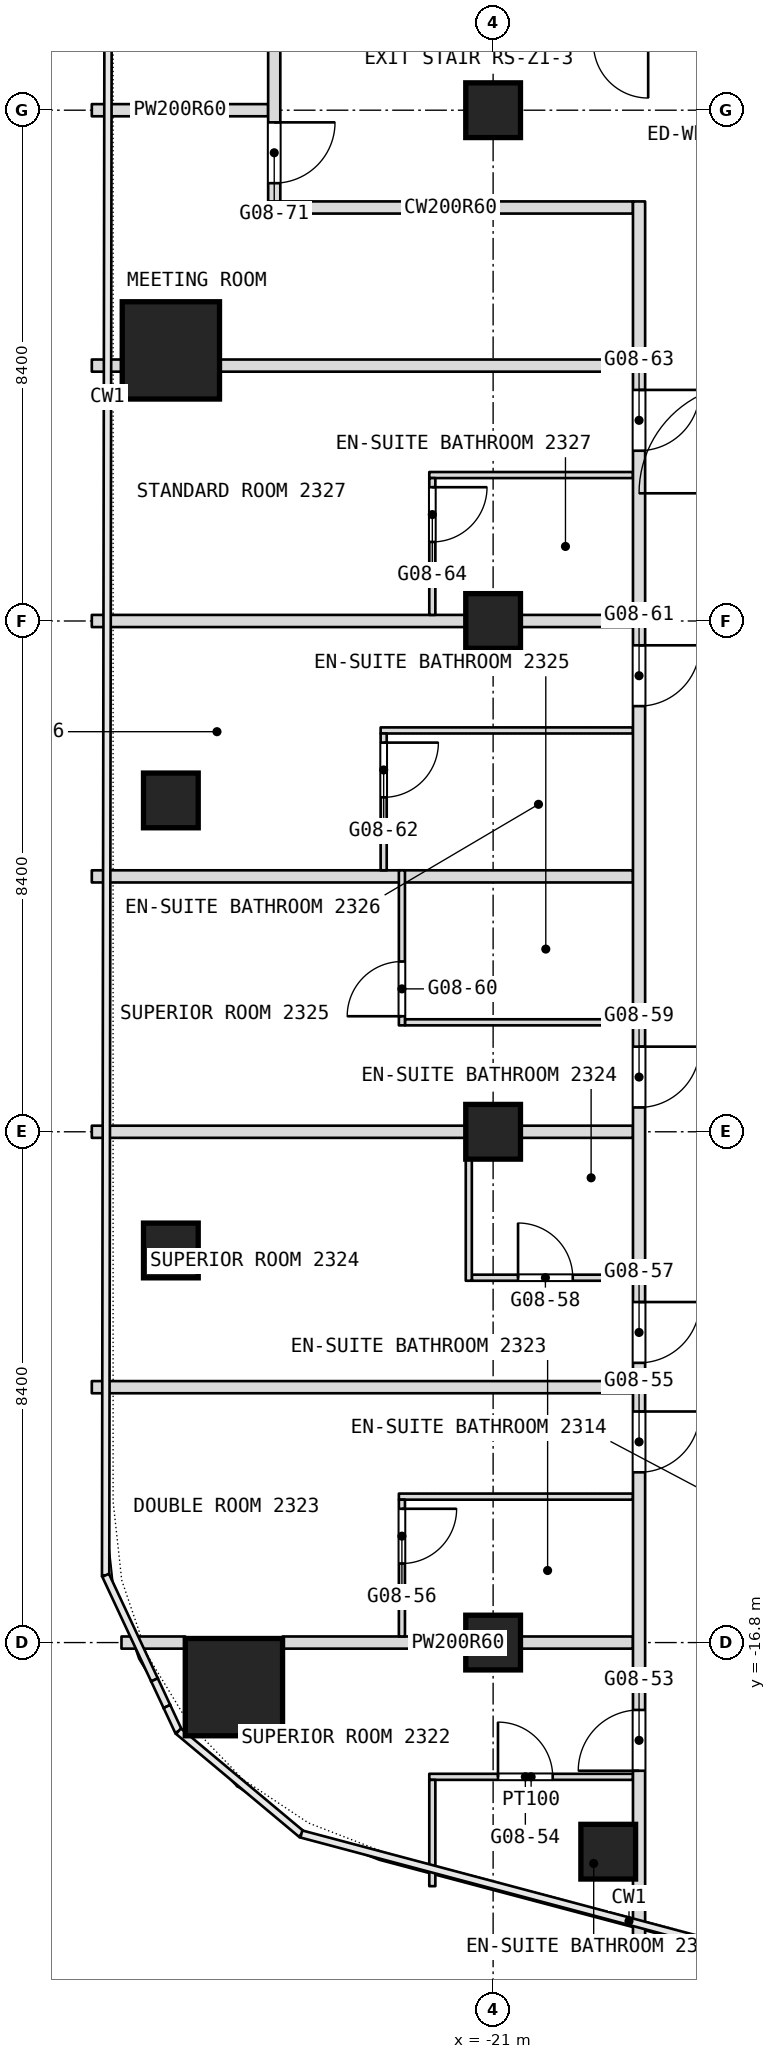
"""IFC4 building model, lengths in metres.
Left out: names, types, materials, properties, quantities, classifications, styles, units other than length and angle.
Written with IfcOpenShell. Run it as: python <this file> out.ifc"""

import sys

from ifc_helpers import new_model, si_unit, direction, frame, frame_2d, origin, origin_2d, place, context, subcontext, project, spatial, rectangle, extrude, element, fill, save


model = new_model("IFC4")
c1 = context("Model", 3, precision=1e-05, world=origin(), true_north=direction((0.0, 1.0)))
c2 = subcontext(c1, "Body", "Model", "MODEL_VIEW")
j1 = project(units=[si_unit("LENGTHUNIT", "METRE"), si_unit("PLANEANGLEUNIT", "RADIAN")], contexts=[c1])
p1 = place(None, origin())
s1 = spatial("IfcSite", under=j1, at=p1, CompositionType="ELEMENT")
p2 = place(p1, origin())
s2 = spatial("IfcBuilding", under=s1, at=p2, CompositionType="ELEMENT")
p3 = place(p2, frame((0.0, 0.0, 108.5)))
s3 = spatial("IfcBuildingStorey", under=s2, at=p3, CompositionType="ELEMENT", Elevation=108.5)
for number, where, z_axis, x_axis in (
    (1, (-25.263, -17.533, 0.0), (0.0, 0.0, 1.0), (1.0, 0.0, 0.0)),
    (2, (-26.3, 4.45, 0.0), (0.0, 0.0, 1.0), (1.0, 0.0, 0.0)),
):
    element("IfcColumn", number, at=place(p3, frame(where, z_axis=z_axis, x_axis=x_axis)), inside=s3, PredefinedType="COLUMN", context=c2, shape_type="SweptSolid", body=[
        extrude(rectangle(XDim=1.6, YDim=1.6, at=origin_2d()), origin(), (0.0, 0.0, 1.0), 3.6),
    ])
for number, where, z_axis, x_axis in (
    (3, (-21.0, -16.8, 0.0), (0.0, 0.0, 1.0), (1.0, 0.0, 0.0)),
    (4, (-21.0, -8.4, 0.0), (0.0, 0.0, 1.0), (1.0, 0.0, 0.0)),
    (5, (-21.0, 0.0, 0.0), (0.0, 0.0, 1.0), (1.0, 0.0, 0.0)),
    (6, (-21.0, 8.4, 0.0), (0.0, 0.0, 1.0), (1.0, 0.0, 0.0)),
    (7, (-26.3, -10.352, 0.0), (0.0, 0.0, 1.0), (1.0, 0.0, 0.0)),
    (8, (-26.3, -2.951, 0.0), (0.0, 0.0, 1.0), (1.0, 0.0, 0.0)),
    (9, (-19.107, -20.239, 0.0), (0.0, 0.0, 1.0), (1.0, 0.0, 0.0)),
):
    element("IfcColumn", number, at=place(p3, frame(where, z_axis=z_axis, x_axis=x_axis)), inside=s3, PredefinedType="COLUMN", context=c2, shape_type="SweptSolid", body=[
        extrude(rectangle(XDim=0.9, YDim=0.9, at=origin_2d()), origin(), (0.0, 0.0, 1.0), 3.6),
    ])
p4 = place(p3, frame((-22.05, -19.008, 0.0), z_axis=(0.0, 0.0, 1.0), x_axis=(1.0, 0.0, 0.0)))
e10 = element("IfcWall", 10, at=p4, inside=s3, PredefinedType="PARTITIONING", context=c2, shape_type="SweptSolid", body=[
    extrude(rectangle(XDim=3.35, YDim=0.1, at=frame_2d((1.675, 0.0))), origin(), (0.0, 0.0, 1.0), 3.34),
])
p5 = place(p4, frame((1.13, 0.0, 0.0)))
e11 = element("IfcOpeningElement", 11, at=p5, cuts=e10, PredefinedType="OPENING", context=c2, shape_type="SweptSolid", body=[
    extrude(rectangle(XDim=0.9, YDim=2.1, at=frame_2d((0.45, 1.05))), frame((0.0, 0.05, 0.0), z_axis=(0.0, -1.0, 0.0), x_axis=(1.0, 0.0, 0.0)), (0.0, 0.0, 1.0), 0.1),
])
p6 = place(p3, frame((-27.112, -16.8, 0.0), z_axis=(0.0, 0.0, 1.0), x_axis=(1.0, 0.0, 0.0)))
e12 = element("IfcWall", 12, at=p6, inside=s3, PredefinedType="PARTITIONING", context=c2, shape_type="SweptSolid", body=[
    extrude(rectangle(XDim=1.049, YDim=0.2, at=frame_2d((0.524, 0.0))), origin(), (0.0, 0.0, 1.0), 3.34),
])
p7 = place(p3, frame((-24.463, -16.8, 0.0), z_axis=(0.0, 0.0, 1.0), x_axis=(1.0, 0.0, 0.0)))
e13 = element("IfcWall", 13, at=p7, inside=s3, PredefinedType="PARTITIONING", context=c2, shape_type="SweptSolid", body=[
    extrude(rectangle(XDim=5.763, YDim=0.2, at=frame_2d((2.881, 0.0))), origin(), (0.0, 0.0, 1.0), 2.89),
])
p8 = place(p3, frame((-22.55, -14.4, 0.0), z_axis=(0.0, 0.0, 1.0), x_axis=(1.0, 0.0, 0.0)))
e14 = element("IfcWall", 14, at=p8, inside=s3, PredefinedType="PARTITIONING", context=c2, shape_type="SweptSolid", body=[
    extrude(rectangle(XDim=3.85, YDim=0.1, at=frame_2d((1.925, 0.0))), origin(), (0.0, 0.0, 1.0), 3.34),
])
p9 = place(p3, frame((-27.6, -12.6, 0.0), z_axis=(0.0, 0.0, 1.0), x_axis=(1.0, 0.0, 0.0)))
e15 = element("IfcWall", 15, at=p9, inside=s3, PredefinedType="PARTITIONING", context=c2, shape_type="SweptSolid", body=[
    extrude(rectangle(XDim=8.9, YDim=0.2, at=frame_2d((4.45, 0.0))), origin(), (0.0, 0.0, 1.0), 3.34),
])
p10 = place(p3, frame((-21.35, -10.8, 0.0), z_axis=(0.0, 0.0, 1.0), x_axis=(1.0, 0.0, 0.0)))
e16 = element("IfcWall", 16, at=p10, inside=s3, PredefinedType="PARTITIONING", context=c2, shape_type="SweptSolid", body=[
    extrude(rectangle(XDim=2.65, YDim=0.1, at=frame_2d((1.325, 0.0))), origin(), (0.0, 0.0, 1.0), 3.34),
])
p11 = place(p10, frame((0.76, 0.0, 0.0)))
e17 = element("IfcOpeningElement", 17, at=p11, cuts=e16, PredefinedType="OPENING", context=c2, shape_type="SweptSolid", body=[
    extrude(rectangle(XDim=0.9, YDim=2.1, at=frame_2d((0.45, 1.05))), frame((0.0, 0.05, 0.0), z_axis=(0.0, -1.0, 0.0), x_axis=(1.0, 0.0, 0.0)), (0.0, 0.0, 1.0), 0.1),
])
p12 = place(p3, frame((-27.6, -8.4, 0.0), z_axis=(0.0, 0.0, 1.0), x_axis=(1.0, 0.0, 0.0)))
e18 = element("IfcWall", 18, at=p12, inside=s3, PredefinedType="PARTITIONING", context=c2, shape_type="SweptSolid", body=[
    extrude(rectangle(XDim=8.9, YDim=0.2, at=frame_2d((4.45, 0.0))), origin(), (0.0, 0.0, 1.0), 2.89),
])
p13 = place(p3, frame((-22.45, -6.6, 0.0), z_axis=(0.0, 0.0, 1.0), x_axis=(1.0, 0.0, 0.0)))
e19 = element("IfcWall", 19, at=p13, inside=s3, PredefinedType="PARTITIONING", context=c2, shape_type="SweptSolid", body=[
    extrude(rectangle(XDim=3.75, YDim=0.1, at=frame_2d((1.875, 0.0))), origin(), (0.0, 0.0, 1.0), 3.34),
])
p14 = place(p3, frame((-27.6, -4.2, 0.0), z_axis=(0.0, 0.0, 1.0), x_axis=(1.0, 0.0, 0.0)))
e20 = element("IfcWall", 20, at=p14, inside=s3, PredefinedType="PARTITIONING", context=c2, shape_type="SweptSolid", body=[
    extrude(rectangle(XDim=8.9, YDim=0.2, at=frame_2d((4.45, 0.0))), origin(), (0.0, 0.0, 1.0), 3.34),
])
p15 = place(p3, frame((-22.85, -1.8, 0.0), z_axis=(0.0, 0.0, 1.0), x_axis=(1.0, 0.0, 0.0)))
e21 = element("IfcWall", 21, at=p15, inside=s3, PredefinedType="PARTITIONING", context=c2, shape_type="SweptSolid", body=[
    extrude(rectangle(XDim=4.15, YDim=0.1, at=frame_2d((2.075, 0.0))), origin(), (0.0, 0.0, 1.0), 3.34),
])
p16 = place(p3, frame((-27.6, 0.0, 0.0), z_axis=(0.0, 0.0, 1.0), x_axis=(1.0, 0.0, 0.0)))
e22 = element("IfcWall", 22, at=p16, inside=s3, PredefinedType="PARTITIONING", context=c2, shape_type="SweptSolid", body=[
    extrude(rectangle(XDim=8.9, YDim=0.2, at=frame_2d((4.45, 0.0))), origin(), (0.0, 0.0, 1.0), 2.89),
])
p17 = place(p3, frame((-22.05, 2.4, 0.0), z_axis=(0.0, 0.0, 1.0), x_axis=(1.0, 0.0, 0.0)))
e23 = element("IfcWall", 23, at=p17, inside=s3, PredefinedType="PARTITIONING", context=c2, shape_type="SweptSolid", body=[
    extrude(rectangle(XDim=3.35, YDim=0.1, at=frame_2d((1.675, 0.0))), origin(), (0.0, 0.0, 1.0), 3.34),
])
p18 = place(p3, frame((-27.6, 4.2, 0.0), z_axis=(0.0, 0.0, 1.0), x_axis=(1.0, 0.0, 0.0)))
e24 = element("IfcWall", 24, at=p18, inside=s3, PredefinedType="PARTITIONING", context=c2, shape_type="SweptSolid", body=[
    extrude(rectangle(XDim=0.5, YDim=0.2, at=frame_2d((0.25, 0.0))), origin(), (0.0, 0.0, 1.0), 3.34),
])
p19 = place(p3, frame((-25.5, 4.2, 0.0), z_axis=(0.0, 0.0, 1.0), x_axis=(1.0, 0.0, 0.0)))
e25 = element("IfcWall", 25, at=p19, inside=s3, PredefinedType="PARTITIONING", context=c2, shape_type="SweptSolid", body=[
    extrude(rectangle(XDim=6.8, YDim=0.2, at=frame_2d((3.4, 0.0))), origin(), (0.0, 0.0, 1.0), 3.34),
])
p20 = place(p3, frame((-24.7, 6.8, 0.0), z_axis=(0.0, 0.0, 1.0), x_axis=(1.0, 0.0, 0.0)))
e26 = element("IfcWall", 26, at=p20, inside=s3, PredefinedType="PARTITIONING", context=c2, shape_type="SweptSolid", body=[
    extrude(rectangle(XDim=6.0, YDim=0.2, at=frame_2d((3.0, 0.0))), origin(), (0.0, 0.0, 1.0), 3.34),
])
p21 = place(p3, frame((-27.6, 8.4, 0.0), z_axis=(0.0, 0.0, 1.0), x_axis=(1.0, 0.0, 0.0)))
e27 = element("IfcWall", 27, at=p21, inside=s3, PredefinedType="PARTITIONING", context=c2, shape_type="SweptSolid", body=[
    extrude(rectangle(XDim=2.9, YDim=0.2, at=frame_2d((1.45, 0.0))), origin(), (0.0, 0.0, 1.0), 2.89),
])
p22 = place(p3, frame((-18.6, -21.708, 0.0), z_axis=(0.0, 0.0, 1.0), x_axis=(0.0, 1.0, 0.0)))
e28 = element("IfcWall", 28, at=p22, inside=s3, PredefinedType="PARTITIONING", context=c2, shape_type="SweptSolid", body=[
    extrude(rectangle(XDim=28.608, YDim=0.2, at=frame_2d((14.304, 0.0))), origin(), (0.0, 0.0, 1.0), 3.34),
])
p23 = place(p22, frame((2.8, 0.0, 0.0)))
e29 = element("IfcOpeningElement", 29, at=p23, cuts=e28, PredefinedType="OPENING", context=c2, shape_type="SweptSolid", body=[
    extrude(rectangle(XDim=1.0, YDim=2.1, at=frame_2d((0.5, 1.05))), frame((0.0, 0.1, 0.0), z_axis=(0.0, -1.0, 0.0), x_axis=(1.0, 0.0, 0.0)), (0.0, 0.0, 1.0), 0.2),
])
p24 = place(p22, frame((7.708, 0.0, 0.0)))
e30 = element("IfcOpeningElement", 30, at=p24, cuts=e28, PredefinedType="OPENING", context=c2, shape_type="SweptSolid", body=[
    extrude(rectangle(XDim=1.0, YDim=2.1, at=frame_2d((0.5, 1.05))), frame((0.0, 0.1, 0.0), z_axis=(0.0, -1.0, 0.0), x_axis=(1.0, 0.0, 0.0)), (0.0, 0.0, 1.0), 0.2),
])
p25 = place(p22, frame((9.508, 0.0, 0.0)))
e31 = element("IfcOpeningElement", 31, at=p25, cuts=e28, PredefinedType="OPENING", context=c2, shape_type="SweptSolid", body=[
    extrude(rectangle(XDim=1.0, YDim=2.1, at=frame_2d((0.5, 1.05))), frame((0.0, 0.1, 0.0), z_axis=(0.0, -1.0, 0.0), x_axis=(1.0, 0.0, 0.0)), (0.0, 0.0, 1.0), 0.2),
])
p26 = place(p22, frame((13.708, 0.0, 0.0)))
e32 = element("IfcOpeningElement", 32, at=p26, cuts=e28, PredefinedType="OPENING", context=c2, shape_type="SweptSolid", body=[
    extrude(rectangle(XDim=1.0, YDim=2.1, at=frame_2d((0.5, 1.05))), frame((0.0, 0.1, 0.0), z_axis=(0.0, -1.0, 0.0), x_axis=(1.0, 0.0, 0.0)), (0.0, 0.0, 1.0), 0.2),
])
p27 = place(p22, frame((20.308, 0.0, 0.0)))
e33 = element("IfcOpeningElement", 33, at=p27, cuts=e28, PredefinedType="OPENING", context=c2, shape_type="SweptSolid", body=[
    extrude(rectangle(XDim=1.0, YDim=2.1, at=frame_2d((0.5, 1.05))), frame((0.0, 0.1, 0.0), z_axis=(0.0, -1.0, 0.0), x_axis=(1.0, 0.0, 0.0)), (0.0, 0.0, 1.0), 0.2),
])
p28 = place(p22, frame((24.508, 0.0, 0.0)))
e34 = element("IfcOpeningElement", 34, at=p28, cuts=e28, PredefinedType="OPENING", context=c2, shape_type="SweptSolid", body=[
    extrude(rectangle(XDim=1.0, YDim=2.1, at=frame_2d((0.5, 1.05))), frame((0.0, 0.1, 0.0), z_axis=(0.0, -1.0, 0.0), x_axis=(1.0, 0.0, 0.0)), (0.0, 0.0, 1.0), 0.2),
])
p29 = place(p3, frame((-21.4, -10.85, 0.0), z_axis=(0.0, 0.0, 1.0), x_axis=(0.0, 1.0, 0.0)))
e35 = element("IfcWall", 35, at=p29, inside=s3, PredefinedType="PARTITIONING", context=c2, shape_type="SweptSolid", body=[
    extrude(rectangle(XDim=2.55, YDim=0.1, at=frame_2d((1.275, 0.0))), origin(), (0.0, 0.0, 1.0), 3.34),
])
p30 = place(p3, frame((-22.0, -20.806, 0.0), z_axis=(0.0, 0.0, 1.0), x_axis=(0.0, 1.0, 0.0)))
e36 = element("IfcWall", 36, at=p30, inside=s3, PredefinedType="PARTITIONING", context=c2, shape_type="SweptSolid", body=[
    extrude(rectangle(XDim=1.748, YDim=0.1, at=frame_2d((0.874, 0.0))), origin(), (0.0, 0.0, 1.0), 3.34),
])
p31 = place(p3, frame((-22.0, 0.1, 0.0), z_axis=(0.0, 0.0, 1.0), x_axis=(0.0, 1.0, 0.0)))
e37 = element("IfcWall", 37, at=p31, inside=s3, PredefinedType="PARTITIONING", context=c2, shape_type="SweptSolid", body=[
    extrude(rectangle(XDim=2.25, YDim=0.1, at=frame_2d((1.125, 0.0))), origin(), (0.0, 0.0, 1.0), 3.34),
])
p32 = place(p31, frame((1.2, 0.0, 0.0)))
e38 = element("IfcOpeningElement", 38, at=p32, cuts=e37, PredefinedType="OPENING", context=c2, shape_type="SweptSolid", body=[
    extrude(rectangle(XDim=0.9, YDim=2.1, at=frame_2d((0.45, 1.05))), frame((0.0, 0.05, 0.0), z_axis=(0.0, -1.0, 0.0), x_axis=(1.0, 0.0, 0.0)), (0.0, 0.0, 1.0), 0.1),
])
p33 = place(p3, frame((-22.5, -16.7, 0.0), z_axis=(0.0, 0.0, 1.0), x_axis=(0.0, 1.0, 0.0)))
e39 = element("IfcWall", 39, at=p33, inside=s3, PredefinedType="PARTITIONING", context=c2, shape_type="SweptSolid", body=[
    extrude(rectangle(XDim=2.25, YDim=0.1, at=frame_2d((1.125, 0.0))), origin(), (0.0, 0.0, 1.0), 3.34),
])
p34 = place(p33, frame((1.2, 0.0, 0.0)))
e40 = element("IfcOpeningElement", 40, at=p34, cuts=e39, PredefinedType="OPENING", context=c2, shape_type="SweptSolid", body=[
    extrude(rectangle(XDim=0.9, YDim=2.1, at=frame_2d((0.45, 1.05))), frame((0.0, 0.05, 0.0), z_axis=(0.0, -1.0, 0.0), x_axis=(1.0, 0.0, 0.0)), (0.0, 0.0, 1.0), 0.1),
])
p35 = place(p3, frame((-22.5, -6.65, 0.0), z_axis=(0.0, 0.0, 1.0), x_axis=(0.0, 1.0, 0.0)))
e41 = element("IfcWall", 41, at=p35, inside=s3, PredefinedType="PARTITIONING", context=c2, shape_type="SweptSolid", body=[
    extrude(rectangle(XDim=2.55, YDim=0.1, at=frame_2d((1.275, 0.0))), origin(), (0.0, 0.0, 1.0), 3.34),
])
p36 = place(p35, frame((0.15, 0.0, 0.0)))
e42 = element("IfcOpeningElement", 42, at=p36, cuts=e41, PredefinedType="OPENING", context=c2, shape_type="SweptSolid", body=[
    extrude(rectangle(XDim=0.9, YDim=2.1, at=frame_2d((0.45, 1.05))), frame((0.0, 0.05, 0.0), z_axis=(0.0, -1.0, 0.0), x_axis=(1.0, 0.0, 0.0)), (0.0, 0.0, 1.0), 0.1),
])
p37 = place(p3, frame((-22.8, -4.1, 0.0), z_axis=(0.0, 0.0, 1.0), x_axis=(0.0, 1.0, 0.0)))
e43 = element("IfcWall", 43, at=p37, inside=s3, PredefinedType="PARTITIONING", context=c2, shape_type="SweptSolid", body=[
    extrude(rectangle(XDim=2.25, YDim=0.1, at=frame_2d((1.125, 0.0))), origin(), (0.0, 0.0, 1.0), 3.34),
])
p38 = place(p37, frame((1.2, 0.0, 0.0)))
e44 = element("IfcOpeningElement", 44, at=p38, cuts=e43, PredefinedType="OPENING", context=c2, shape_type="SweptSolid", body=[
    extrude(rectangle(XDim=0.9, YDim=2.1, at=frame_2d((0.45, 1.05))), frame((0.0, 0.05, 0.0), z_axis=(0.0, -1.0, 0.0), x_axis=(1.0, 0.0, 0.0)), (0.0, 0.0, 1.0), 0.1),
])
p39 = place(p3, frame((-24.6, 6.9, 0.0), z_axis=(0.0, 0.0, 1.0), x_axis=(0.0, 1.0, 0.0)))
e45 = element("IfcWall", 45, at=p39, inside=s3, PredefinedType="PARTITIONING", context=c2, shape_type="SweptSolid", body=[
    extrude(rectangle(XDim=11.6, YDim=0.2, at=frame_2d((5.8, 0.0))), origin(), (0.0, 0.0, 1.0), 3.34),
])
p40 = place(p39, frame((5.45, 0.0, 0.0)))
e46 = element("IfcOpeningElement", 46, at=p40, cuts=e45, PredefinedType="OPENING", context=c2, shape_type="SweptSolid", body=[
    extrude(rectangle(XDim=1.8, YDim=2.1, at=frame_2d((0.9, 1.05))), frame((0.0, 0.1, 0.0), z_axis=(0.0, -1.0, 0.0), x_axis=(1.0, 0.0, 0.0)), (0.0, 0.0, 1.0), 0.2),
])
p41 = place(p39, frame((0.3, 0.0, 0.0)))
e47 = element("IfcOpeningElement", 47, at=p41, cuts=e45, PredefinedType="OPENING", context=c2, shape_type="SweptSolid", body=[
    extrude(rectangle(XDim=1.0, YDim=2.1, at=frame_2d((0.5, 1.05))), frame((0.0, 0.1, 0.0), z_axis=(0.0, -1.0, 0.0), x_axis=(1.0, 0.0, 0.0)), (0.0, 0.0, 1.0), 0.2),
])
p42 = place(p5, origin())
e48 = element("IfcDoor", 48, at=p42, inside=s3, OperationType="SINGLE_SWING_LEFT", PredefinedType="DOOR", context=c2, shape_type="SweptSolid", body=[
    extrude(rectangle(XDim=0.9, YDim=2.1, at=frame_2d((0.45, 1.05))), frame((0.0, 0.025, 0.0), z_axis=(0.0, -1.0, 0.0), x_axis=(1.0, 0.0, 0.0)), (0.0, 0.0, 1.0), 0.05),
])
fill(e11, e48)
p43 = place(p11, origin())
e49 = element("IfcDoor", 49, at=p43, inside=s3, OperationType="SINGLE_SWING_LEFT", PredefinedType="DOOR", context=c2, shape_type="SweptSolid", body=[
    extrude(rectangle(XDim=0.9, YDim=2.1, at=frame_2d((0.45, 1.05))), frame((0.0, 0.025, 0.0), z_axis=(0.0, -1.0, 0.0), x_axis=(1.0, 0.0, 0.0)), (0.0, 0.0, 1.0), 0.05),
])
fill(e17, e49)
p44 = place(p23, origin())
e50 = element("IfcDoor", 50, at=p44, inside=s3, OperationType="SINGLE_SWING_LEFT", PredefinedType="DOOR", context=c2, shape_type="SweptSolid", body=[
    extrude(rectangle(XDim=1.0, YDim=2.1, at=frame_2d((0.5, 1.05))), frame((0.0, 0.025, 0.0), z_axis=(0.0, -1.0, 0.0), x_axis=(1.0, 0.0, 0.0)), (0.0, 0.0, 1.0), 0.05),
])
fill(e29, e50)
p45 = place(p24, origin())
e51 = element("IfcDoor", 51, at=p45, inside=s3, OperationType="SINGLE_SWING_RIGHT", PredefinedType="DOOR", context=c2, shape_type="SweptSolid", body=[
    extrude(rectangle(XDim=1.0, YDim=2.1, at=frame_2d((0.5, 1.05))), frame((0.0, 0.025, 0.0), z_axis=(0.0, -1.0, 0.0), x_axis=(1.0, 0.0, 0.0)), (0.0, 0.0, 1.0), 0.05),
])
fill(e30, e51)
p46 = place(p25, origin())
e52 = element("IfcDoor", 52, at=p46, inside=s3, OperationType="SINGLE_SWING_RIGHT", PredefinedType="DOOR", context=c2, shape_type="SweptSolid", body=[
    extrude(rectangle(XDim=1.0, YDim=2.1, at=frame_2d((0.5, 1.05))), frame((0.0, 0.025, 0.0), z_axis=(0.0, -1.0, 0.0), x_axis=(1.0, 0.0, 0.0)), (0.0, 0.0, 1.0), 0.05),
])
fill(e31, e52)
p47 = place(p26, origin())
e53 = element("IfcDoor", 53, at=p47, inside=s3, OperationType="SINGLE_SWING_RIGHT", PredefinedType="DOOR", context=c2, shape_type="SweptSolid", body=[
    extrude(rectangle(XDim=1.0, YDim=2.1, at=frame_2d((0.5, 1.05))), frame((0.0, 0.025, 0.0), z_axis=(0.0, -1.0, 0.0), x_axis=(1.0, 0.0, 0.0)), (0.0, 0.0, 1.0), 0.05),
])
fill(e32, e53)
p48 = place(p27, origin())
e54 = element("IfcDoor", 54, at=p48, inside=s3, OperationType="SINGLE_SWING_RIGHT", PredefinedType="DOOR", context=c2, shape_type="SweptSolid", body=[
    extrude(rectangle(XDim=1.0, YDim=2.1, at=frame_2d((0.5, 1.05))), frame((0.0, 0.025, 0.0), z_axis=(0.0, -1.0, 0.0), x_axis=(1.0, 0.0, 0.0)), (0.0, 0.0, 1.0), 0.05),
])
fill(e33, e54)
p49 = place(p28, origin())
e55 = element("IfcDoor", 55, at=p49, inside=s3, OperationType="SINGLE_SWING_RIGHT", PredefinedType="DOOR", context=c2, shape_type="SweptSolid", body=[
    extrude(rectangle(XDim=1.0, YDim=2.1, at=frame_2d((0.5, 1.05))), frame((0.0, 0.025, 0.0), z_axis=(0.0, -1.0, 0.0), x_axis=(1.0, 0.0, 0.0)), (0.0, 0.0, 1.0), 0.05),
])
fill(e34, e55)
p50 = place(p32, origin())
e56 = element("IfcDoor", 56, at=p50, inside=s3, OperationType="SINGLE_SWING_LEFT", PredefinedType="DOOR", context=c2, shape_type="SweptSolid", body=[
    extrude(rectangle(XDim=0.9, YDim=2.1, at=frame_2d((0.45, 1.05))), frame((0.0, 0.025, 0.0), z_axis=(0.0, -1.0, 0.0), x_axis=(1.0, 0.0, 0.0)), (0.0, 0.0, 1.0), 0.05),
])
fill(e38, e56)
p51 = place(p34, origin())
e57 = element("IfcDoor", 57, at=p51, inside=s3, OperationType="SINGLE_SWING_LEFT", PredefinedType="DOOR", context=c2, shape_type="SweptSolid", body=[
    extrude(rectangle(XDim=0.9, YDim=2.1, at=frame_2d((0.45, 1.05))), frame((0.0, 0.025, 0.0), z_axis=(0.0, -1.0, 0.0), x_axis=(1.0, 0.0, 0.0)), (0.0, 0.0, 1.0), 0.05),
])
fill(e40, e57)
p52 = place(p36, origin())
e58 = element("IfcDoor", 58, at=p52, inside=s3, OperationType="SINGLE_SWING_RIGHT", PredefinedType="DOOR", context=c2, shape_type="SweptSolid", body=[
    extrude(rectangle(XDim=0.9, YDim=2.1, at=frame_2d((0.45, 1.05))), frame((0.0, 0.025, 0.0), z_axis=(0.0, -1.0, 0.0), x_axis=(1.0, 0.0, 0.0)), (0.0, 0.0, 1.0), 0.05),
])
fill(e42, e58)
p53 = place(p38, origin())
e59 = element("IfcDoor", 59, at=p53, inside=s3, OperationType="SINGLE_SWING_LEFT", PredefinedType="DOOR", context=c2, shape_type="SweptSolid", body=[
    extrude(rectangle(XDim=0.9, YDim=2.1, at=frame_2d((0.45, 1.05))), frame((0.0, 0.025, 0.0), z_axis=(0.0, -1.0, 0.0), x_axis=(1.0, 0.0, 0.0)), (0.0, 0.0, 1.0), 0.05),
])
fill(e44, e59)
p54 = place(p41, origin())
e60 = element("IfcDoor", 60, at=p54, inside=s3, OperationType="SINGLE_SWING_LEFT", PredefinedType="DOOR", context=c2, shape_type="SweptSolid", body=[
    extrude(rectangle(XDim=1.0, YDim=2.1, at=frame_2d((0.5, 1.05))), frame((0.0, 0.025, 0.0), z_axis=(0.0, -1.0, 0.0), x_axis=(1.0, 0.0, 0.0)), (0.0, 0.0, 1.0), 0.05),
])
fill(e47, e60)
save(model, sys.argv[1])
